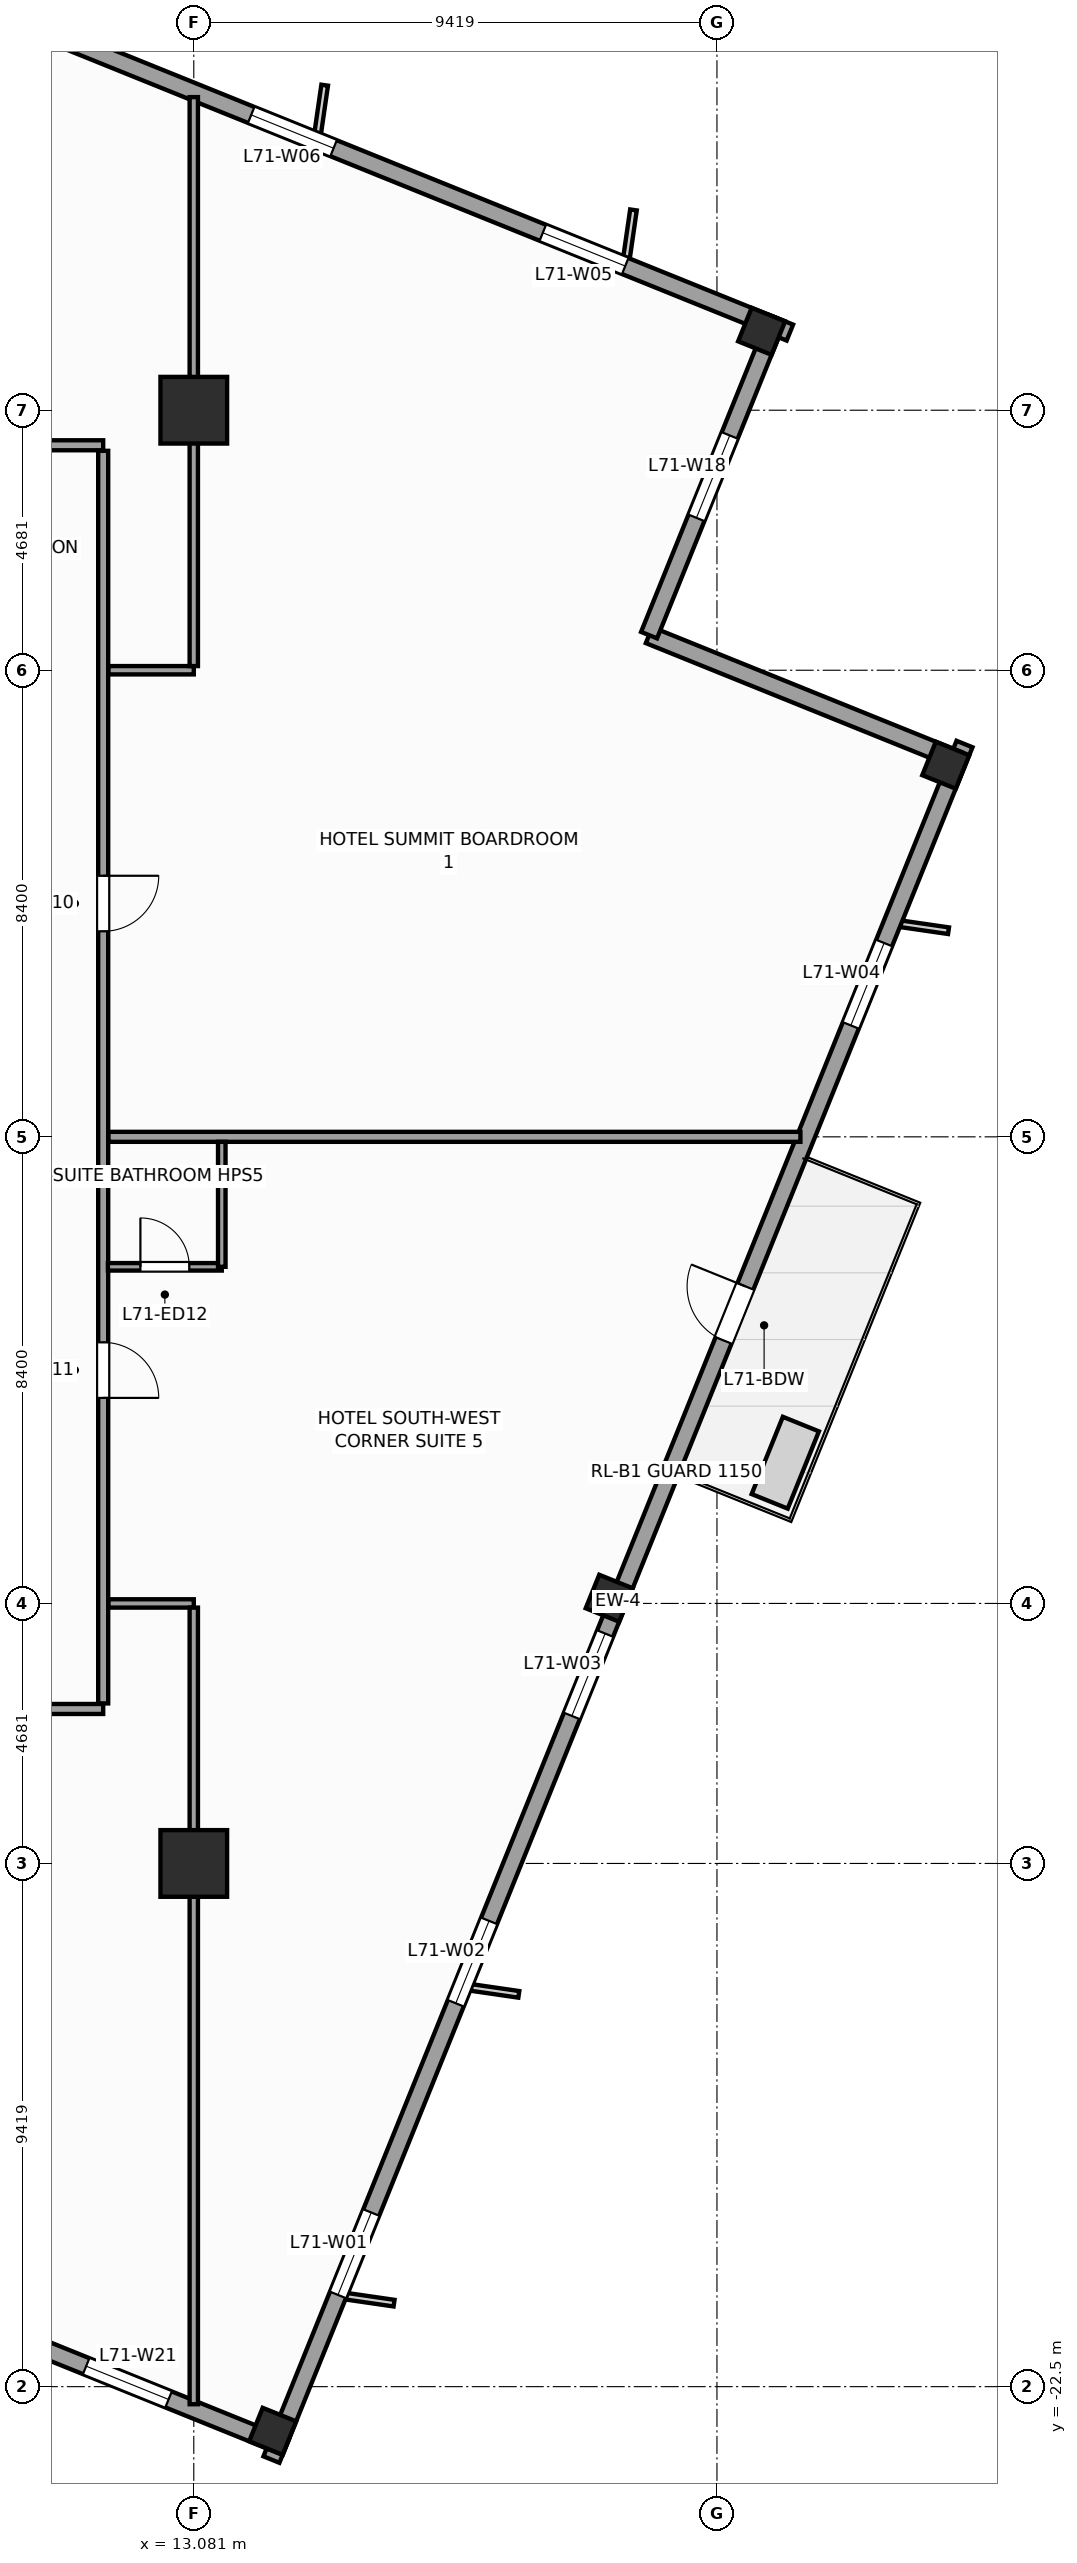
"""IFC4 building model, lengths in metres.
Left out: names, types, materials, properties, quantities, classifications, styles, units other than length and angle.
Written with IfcOpenShell. Run it as: python <this file> out.ifc"""

import sys

from ifc_helpers import new_model, si_unit, direction, frame, frame_2d, origin, origin_2d, place, context, subcontext, project, spatial, rectangle, extrude, source, transform, mapped, element, fill, save


model = new_model("IFC4")
c1 = context("Model", 3, precision=1e-05, world=origin(), true_north=direction((0.0, 1.0)))
c2 = subcontext(c1, "Body", "Model", "MODEL_VIEW")
j1 = project(units=[si_unit("LENGTHUNIT", "METRE"), si_unit("PLANEANGLEUNIT", "RADIAN")], contexts=[c1])
p1 = place(None, origin())
s1 = spatial("IfcSite", under=j1, at=p1, CompositionType="ELEMENT")
p2 = place(p1, origin())
s2 = spatial("IfcBuilding", under=s1, at=p2, CompositionType="ELEMENT")
p3 = place(p2, frame((0.0, 0.0, 290.4)))
s3 = spatial("IfcBuildingStorey", under=s2, at=p3, CompositionType="ELEMENT", Elevation=290.4)
m1 = source(origin(), c2, "Body", "SweptSolid", [
    extrude(rectangle(XDim=1.2, YDim=1.2, at=origin_2d()), origin(), (0.0, 0.0, 1.0), 3.6),
])
for number, where, z_axis, x_axis in (
    (1, (13.081, -13.081, 0.0), (0.0, 0.0, 1.0), (1.0, 0.0, 0.0)),
    (2, (13.081, 13.081, 0.0), (0.0, 0.0, 1.0), (1.0, 0.0, 0.0)),
):
    element("IfcColumn", number, at=place(p3, frame(where, z_axis=z_axis, x_axis=x_axis)), inside=s3, PredefinedType="COLUMN", context=c2, shape_type="MappedRepresentation", body=[
        mapped(m1, transform((0.0, 0.0, 0.0), scale=1.0)),
    ])
m2 = source(origin(), c2, "Body", "SweptSolid", [
    extrude(rectangle(XDim=0.65, YDim=0.65, at=origin_2d()), origin(), (0.0, 0.0, 1.0), 3.6),
])
for number, where, z_axis, x_axis in (
    (3, (14.501, -23.304, 0.0), (0.0, 0.0, 1.0), (0.375, 0.927, 0.0)),
    (4, (20.56, -8.307, 0.0), (0.0, 0.0, 1.0), (0.375, 0.927, 0.0)),
    (5, (26.62, 6.69, 0.0), (0.0, 0.0, 1.0), (0.375, 0.927, 0.0)),
    (6, (23.304, 14.501, 0.0), (0.0, 0.0, 1.0), (0.375, 0.927, 0.0)),
):
    element("IfcColumn", number, at=place(p3, frame(where, z_axis=z_axis, x_axis=x_axis)), inside=s3, PredefinedType="COLUMN", context=c2, shape_type="MappedRepresentation", body=[
        mapped(m2, transform((0.0, 0.0, 0.0), scale=1.0)),
    ])
p4 = place(p3, frame((14.479, -23.813, 0.0), z_axis=(0.0, 0.0, 1.0), x_axis=(0.374609557019, 0.927182657188, 0.0)))
e7 = element("IfcWall", 7, at=p4, inside=s3, PredefinedType="STANDARD", context=c2, shape_type="SweptSolid", body=[
    extrude(rectangle(XDim=33.31, YDim=0.31, at=frame_2d((16.655, 0.0))), origin(), (0.0, 0.0, 1.0), 2.75),
])
p5 = place(p4, frame((21.73, 0.0, 0.0)))
e8 = element("IfcOpeningElement", 8, at=p5, cuts=e7, PredefinedType="OPENING", context=c2, shape_type="SweptSolid", body=[
    extrude(rectangle(XDim=1.05, YDim=2.25, at=frame_2d((0.525, 1.125))), frame((0.0, 0.165, 0.0), z_axis=(0.0, -1.0, 0.0), x_axis=(1.0, 0.0, 0.0)), (0.0, 0.0, 1.0), 0.33),
])
p6 = place(p4, frame((3.197, 0.0, 0.47)))
e9 = element("IfcOpeningElement", 9, at=p6, cuts=e7, PredefinedType="OPENING", context=c2, shape_type="SweptSolid", body=[
    extrude(rectangle(XDim=1.6, YDim=2.1, at=frame_2d((0.8, 1.05))), frame((0.0, 0.165, 0.0), z_axis=(0.0, -1.0, 0.0), x_axis=(1.0, 0.0, 0.0)), (0.0, 0.0, 1.0), 0.33),
])
p7 = place(p4, frame((8.86, 0.0, 0.47)))
e10 = element("IfcOpeningElement", 10, at=p7, cuts=e7, PredefinedType="OPENING", context=c2, shape_type="SweptSolid", body=[
    extrude(rectangle(XDim=1.6, YDim=2.1, at=frame_2d((0.8, 1.05))), frame((0.0, 0.165, 0.0), z_axis=(0.0, -1.0, 0.0), x_axis=(1.0, 0.0, 0.0)), (0.0, 0.0, 1.0), 0.33),
])
p8 = place(p4, frame((14.439, 0.0, 0.47)))
e11 = element("IfcOpeningElement", 11, at=p8, cuts=e7, PredefinedType="OPENING", context=c2, shape_type="SweptSolid", body=[
    extrude(rectangle(XDim=1.6, YDim=2.1, at=frame_2d((0.8, 1.05))), frame((0.0, 0.165, 0.0), z_axis=(0.0, -1.0, 0.0), x_axis=(1.0, 0.0, 0.0)), (0.0, 0.0, 1.0), 0.33),
])
p9 = place(p4, frame((27.847, 0.0, 0.47)))
e12 = element("IfcOpeningElement", 12, at=p9, cuts=e7, PredefinedType="OPENING", context=c2, shape_type="SweptSolid", body=[
    extrude(rectangle(XDim=1.6, YDim=2.1, at=frame_2d((0.8, 1.05))), frame((0.0, 0.165, 0.0), z_axis=(0.0, -1.0, 0.0), x_axis=(1.0, 0.0, 0.0)), (0.0, 0.0, 1.0), 0.33),
])
p10 = place(p3, frame((26.841, 6.784, 0.0), z_axis=(0.0, 0.0, 1.0), x_axis=(-0.927171722085, 0.374636620962, 0.0)))
e13 = element("IfcWall", 13, at=p10, inside=s3, PredefinedType="STANDARD", context=c2, shape_type="SweptSolid", body=[
    extrude(rectangle(XDim=6.0, YDim=0.31, at=frame_2d((3.0, 0.0))), origin(), (0.0, 0.0, 1.0), 2.65),
])
p11 = place(p3, frame((21.278, 9.032, 0.0), z_axis=(0.0, 0.0, 1.0), x_axis=(0.374602739196, 0.927185411764, 0.0)))
e14 = element("IfcWall", 14, at=p11, inside=s3, PredefinedType="STANDARD", context=c2, shape_type="SweptSolid", body=[
    extrude(rectangle(XDim=6.155, YDim=0.31, at=frame_2d((3.078, 0.0))), origin(), (0.0, 0.0, 1.0), 3.35),
])
p12 = place(p11, frame((2.278, 0.0, 0.47)))
e15 = element("IfcOpeningElement", 15, at=p12, cuts=e14, PredefinedType="OPENING", context=c2, shape_type="SweptSolid", body=[
    extrude(rectangle(XDim=1.6, YDim=2.1, at=frame_2d((0.8, 1.05))), frame((0.0, 0.165, 0.0), z_axis=(0.0, -1.0, 0.0), x_axis=(1.0, 0.0, 0.0)), (0.0, 0.0, 1.0), 0.33),
])
p13 = place(p3, frame((23.813, 14.479, 0.0), z_axis=(0.0, 0.0, 1.0), x_axis=(-0.927182657188, 0.374609557019, 0.0)))
e16 = element("IfcWall", 16, at=p13, inside=s3, PredefinedType="STANDARD", context=c2, shape_type="SweptSolid", body=[
    extrude(rectangle(XDim=33.31, YDim=0.31, at=frame_2d((16.655, 0.0))), origin(), (0.0, 0.0, 1.0), 2.75),
])
p14 = place(p13, frame((3.197, 0.0, 0.47)))
e17 = element("IfcOpeningElement", 17, at=p14, cuts=e16, PredefinedType="OPENING", context=c2, shape_type="SweptSolid", body=[
    extrude(rectangle(XDim=1.6, YDim=2.1, at=frame_2d((0.8, 1.05))), frame((0.0, 0.165, 0.0), z_axis=(0.0, -1.0, 0.0), x_axis=(1.0, 0.0, 0.0)), (0.0, 0.0, 1.0), 0.33),
])
p15 = place(p13, frame((8.86, 0.0, 0.47)))
e18 = element("IfcOpeningElement", 18, at=p15, cuts=e16, PredefinedType="OPENING", context=c2, shape_type="SweptSolid", body=[
    extrude(rectangle(XDim=1.6, YDim=2.1, at=frame_2d((0.8, 1.05))), frame((0.0, 0.165, 0.0), z_axis=(0.0, -1.0, 0.0), x_axis=(1.0, 0.0, 0.0)), (0.0, 0.0, 1.0), 0.33),
])
p16 = place(p13, frame((14.439, 0.0, 0.47)))
e19 = element("IfcOpeningElement", 19, at=p16, cuts=e16, PredefinedType="OPENING", context=c2, shape_type="SweptSolid", body=[
    extrude(rectangle(XDim=1.6, YDim=2.1, at=frame_2d((0.8, 1.05))), frame((0.0, 0.165, 0.0), z_axis=(0.0, -1.0, 0.0), x_axis=(1.0, 0.0, 0.0)), (0.0, 0.0, 1.0), 0.33),
])
p17 = place(p13, frame((27.847, 0.0, 0.47)))
e20 = element("IfcOpeningElement", 20, at=p17, cuts=e16, PredefinedType="OPENING", context=c2, shape_type="SweptSolid", body=[
    extrude(rectangle(XDim=1.6, YDim=2.1, at=frame_2d((0.8, 1.05))), frame((0.0, 0.165, 0.0), z_axis=(0.0, -1.0, 0.0), x_axis=(1.0, 0.0, 0.0)), (0.0, 0.0, 1.0), 0.33),
])
p18 = place(p3, frame((9.032, -21.278, 0.0), z_axis=(0.0, 0.0, 1.0), x_axis=(0.927185411764, -0.374602739196, 0.0)))
e21 = element("IfcWall", 21, at=p18, inside=s3, PredefinedType="STANDARD", context=c2, shape_type="SweptSolid", body=[
    extrude(rectangle(XDim=6.155, YDim=0.31, at=frame_2d((3.078, 0.0))), origin(), (0.0, 0.0, 1.0), 3.35),
])
p19 = place(p18, frame((2.278, 0.0, 0.47)))
e22 = element("IfcOpeningElement", 22, at=p19, cuts=e21, PredefinedType="OPENING", context=c2, shape_type="SweptSolid", body=[
    extrude(rectangle(XDim=1.6, YDim=2.1, at=frame_2d((0.8, 1.05))), frame((0.0, 0.165, 0.0), z_axis=(0.0, -1.0, 0.0), x_axis=(1.0, 0.0, 0.0)), (0.0, 0.0, 1.0), 0.33),
])
p20 = place(p3, frame((-11.35, -10.3, 0.0), z_axis=(0.0, 0.0, 1.0), x_axis=(1.0, 0.0, 0.0)))
e23 = element("IfcWall", 23, at=p20, inside=s3, PredefinedType="PARTITIONING", context=c2, shape_type="SweptSolid", body=[
    extrude(rectangle(XDim=22.8, YDim=0.18, at=frame_2d((11.4, 0.0))), origin(), (0.0, 0.0, 1.0), 3.35),
])
p21 = place(p20, frame((12.336, 0.0, 0.0)))
e24 = element("IfcOpeningElement", 24, at=p21, cuts=e23, PredefinedType="OPENING", context=c2, shape_type="SweptSolid", body=[
    extrude(rectangle(XDim=0.95, YDim=2.1, at=frame_2d((0.475, 1.05))), frame((0.0, 0.1, 0.0), z_axis=(0.0, -1.0, 0.0), x_axis=(1.0, 0.0, 0.0)), (0.0, 0.0, 1.0), 0.2),
])
p22 = place(p20, frame((17.71, 0.0, 0.0)))
e25 = element("IfcOpeningElement", 25, at=p22, cuts=e23, PredefinedType="OPENING", context=c2, shape_type="SweptSolid", body=[
    extrude(rectangle(XDim=1.0, YDim=2.15, at=frame_2d((0.5, 1.075))), frame((0.0, 0.1, 0.0), z_axis=(0.0, -1.0, 0.0), x_axis=(1.0, 0.0, 0.0)), (0.0, 0.0, 1.0), 0.2),
])
p23 = place(p20, frame((5.339, 0.0, 0.0)))
e26 = element("IfcOpeningElement", 26, at=p23, cuts=e23, PredefinedType="OPENING", context=c2, shape_type="SweptSolid", body=[
    extrude(rectangle(XDim=1.0, YDim=2.15, at=frame_2d((0.5, 1.075))), frame((0.0, 0.1, 0.0), z_axis=(0.0, -1.0, 0.0), x_axis=(1.0, 0.0, 0.0)), (0.0, 0.0, 1.0), 0.2),
])
p24 = place(p3, frame((-11.35, 12.45, 0.0), z_axis=(0.0, 0.0, 1.0), x_axis=(1.0, 0.0, 0.0)))
e27 = element("IfcWall", 27, at=p24, inside=s3, PredefinedType="PARTITIONING", context=c2, shape_type="SweptSolid", body=[
    extrude(rectangle(XDim=22.8, YDim=0.18, at=frame_2d((11.4, 0.0))), origin(), (0.0, 0.0, 1.0), 3.35),
])
p25 = place(p24, frame((6.089, 0.0, 0.0)))
e28 = element("IfcOpeningElement", 28, at=p25, cuts=e27, PredefinedType="OPENING", context=c2, shape_type="SweptSolid", body=[
    extrude(rectangle(XDim=1.0, YDim=2.15, at=frame_2d((0.5, 1.075))), frame((0.0, 0.1, 0.0), z_axis=(0.0, -1.0, 0.0), x_axis=(1.0, 0.0, 0.0)), (0.0, 0.0, 1.0), 0.2),
])
p26 = place(p24, frame((17.161, 0.0, 0.0)))
e29 = element("IfcOpeningElement", 29, at=p26, cuts=e27, PredefinedType="OPENING", context=c2, shape_type="SweptSolid", body=[
    extrude(rectangle(XDim=1.0, YDim=2.15, at=frame_2d((0.5, 1.075))), frame((0.0, 0.1, 0.0), z_axis=(0.0, -1.0, 0.0), x_axis=(1.0, 0.0, 0.0)), (0.0, 0.0, 1.0), 0.2),
])
p27 = place(p3, frame((11.45, -10.2, 0.0), z_axis=(0.0, 0.0, 1.0), x_axis=(0.0, 1.0, 0.0)))
e30 = element("IfcWall", 30, at=p27, inside=s3, PredefinedType="PARTITIONING", context=c2, shape_type="SweptSolid", body=[
    extrude(rectangle(XDim=22.55, YDim=0.18, at=frame_2d((11.275, 0.0))), origin(), (0.0, 0.0, 1.0), 3.35),
])
p28 = place(p27, frame((13.9, 0.0, 0.0)))
e31 = element("IfcOpeningElement", 31, at=p28, cuts=e30, PredefinedType="OPENING", context=c2, shape_type="SweptSolid", body=[
    extrude(rectangle(XDim=1.0, YDim=2.15, at=frame_2d((0.5, 1.075))), frame((0.0, 0.1, 0.0), z_axis=(0.0, -1.0, 0.0), x_axis=(1.0, 0.0, 0.0)), (0.0, 0.0, 1.0), 0.2),
])
p29 = place(p27, frame((5.5, 0.0, 0.0)))
e32 = element("IfcOpeningElement", 32, at=p29, cuts=e30, PredefinedType="OPENING", context=c2, shape_type="SweptSolid", body=[
    extrude(rectangle(XDim=1.0, YDim=2.15, at=frame_2d((0.5, 1.075))), frame((0.0, 0.1, 0.0), z_axis=(0.0, -1.0, 0.0), x_axis=(1.0, 0.0, 0.0)), (0.0, 0.0, 1.0), 0.2),
])
p30 = place(p3, frame((11.545, 0.0, 0.0), z_axis=(0.0, 0.0, 1.0), x_axis=(1.0, 0.0, 0.0)))
e33 = element("IfcWall", 33, at=p30, inside=s3, PredefinedType="PARTITIONING", context=c2, shape_type="SweptSolid", body=[
    extrude(rectangle(XDim=12.458, YDim=0.18, at=frame_2d((6.229, 0.0))), origin(), (0.0, 0.0, 1.0), 3.35),
])
p31 = place(p3, frame((11.545, 8.4, 0.0), z_axis=(0.0, 0.0, 1.0), x_axis=(1.0, 0.0, 0.0)))
e34 = element("IfcWall", 34, at=p31, inside=s3, PredefinedType="PARTITIONING", context=c2, shape_type="SweptSolid", body=[
    extrude(rectangle(XDim=1.536, YDim=0.15, at=frame_2d((0.768, 0.0))), origin(), (0.0, 0.0, 1.0), 3.35),
])
p32 = place(p3, frame((13.081, 8.475, 0.0), z_axis=(0.0, 0.0, 1.0), x_axis=(0.0, 1.0, 0.0)))
e35 = element("IfcWall", 35, at=p32, inside=s3, PredefinedType="PARTITIONING", context=c2, shape_type="SweptSolid", body=[
    extrude(rectangle(XDim=10.243, YDim=0.15, at=frame_2d((5.121, 0.0))), origin(), (0.0, 0.0, 1.0), 2.45),
])
p33 = place(p3, frame((11.545, -8.4, 0.0), z_axis=(0.0, 0.0, 1.0), x_axis=(1.0, 0.0, 0.0)))
e36 = element("IfcWall", 36, at=p33, inside=s3, PredefinedType="PARTITIONING", context=c2, shape_type="SweptSolid", body=[
    extrude(rectangle(XDim=1.536, YDim=0.15, at=frame_2d((0.768, 0.0))), origin(), (0.0, 0.0, 1.0), 3.35),
])
p34 = place(p3, frame((13.081, -8.475, 0.0), z_axis=(0.0, 0.0, 1.0), x_axis=(0.0, -1.0, 0.0)))
e37 = element("IfcWall", 37, at=p34, inside=s3, PredefinedType="PARTITIONING", context=c2, shape_type="SweptSolid", body=[
    extrude(rectangle(XDim=14.342, YDim=0.15, at=frame_2d((7.171, 0.0))), origin(), (0.0, 0.0, 1.0), 2.45),
])
p35 = place(p3, frame((11.535, -2.34, 0.0), z_axis=(0.0, 0.0, 1.0), x_axis=(1.0, 0.0, 0.0)))
e38 = element("IfcWall", 38, at=p35, inside=s3, PredefinedType="PARTITIONING", context=c2, shape_type="SweptSolid", body=[
    extrude(rectangle(XDim=2.05, YDim=0.135, at=frame_2d((1.025, 0.0))), origin(), (0.0, 0.0, 1.0), 3.35),
])
p36 = place(p35, frame((0.585, 0.0, 0.0)))
e39 = element("IfcOpeningElement", 39, at=p36, cuts=e38, PredefinedType="OPENING", context=c2, shape_type="SweptSolid", body=[
    extrude(rectangle(XDim=0.88, YDim=2.1, at=frame_2d((0.44, 1.05))), frame((0.0, 0.078, 0.0), z_axis=(0.0, -1.0, 0.0), x_axis=(1.0, 0.0, 0.0)), (0.0, 0.0, 1.0), 0.155),
])
p37 = place(p3, frame((13.585, -2.34, 0.0), z_axis=(0.0, 0.0, 1.0), x_axis=(0.0, 1.0, 0.0)))
e40 = element("IfcWall", 40, at=p37, inside=s3, PredefinedType="PARTITIONING", context=c2, shape_type="SweptSolid", body=[
    extrude(rectangle(XDim=2.25, YDim=0.135, at=frame_2d((1.125, 0.0))), origin(), (0.0, 0.0, 1.0), 3.35),
])
m3 = source(origin(), c2, "Body", "SweptSolid", [
    extrude(rectangle(XDim=1.05, YDim=2.25, at=frame_2d((0.525, 1.125))), frame((0.0, 0.025, 0.0), z_axis=(0.0, -1.0, 0.0), x_axis=(1.0, 0.0, 0.0)), (0.0, 0.0, 1.0), 0.05),
])
p38 = place(p5, origin())
e41 = element("IfcDoor", 41, at=p38, inside=s3, OperationType="SINGLE_SWING_RIGHT", PredefinedType="DOOR", context=c2, shape_type="MappedRepresentation", body=[
    mapped(m3, transform((0.0, 0.0, 0.0), scale=1.0)),
])
fill(e8, e41)
m4 = source(origin(), c2, "Body", "SweptSolid", [
    extrude(rectangle(XDim=1.6, YDim=2.1, at=frame_2d((0.8, 1.05))), frame((0.0, 0.03, 0.0), z_axis=(0.0, -1.0, 0.0), x_axis=(1.0, 0.0, 0.0)), (0.0, 0.0, 1.0), 0.06),
])
p39 = place(p6, origin())
e42 = element("IfcWindow", 42, at=p39, inside=s3, PartitioningType="SINGLE_PANEL", PredefinedType="WINDOW", context=c2, shape_type="MappedRepresentation", body=[
    mapped(m4, transform((0.0, 0.0, 0.0), scale=1.0)),
])
fill(e9, e42)
p40 = place(p7, origin())
e43 = element("IfcWindow", 43, at=p40, inside=s3, PartitioningType="SINGLE_PANEL", PredefinedType="WINDOW", context=c2, shape_type="MappedRepresentation", body=[
    mapped(m4, transform((0.0, 0.0, 0.0), scale=1.0)),
])
fill(e10, e43)
p41 = place(p8, origin())
e44 = element("IfcWindow", 44, at=p41, inside=s3, PartitioningType="SINGLE_PANEL", PredefinedType="WINDOW", context=c2, shape_type="MappedRepresentation", body=[
    mapped(m4, transform((0.0, 0.0, 0.0), scale=1.0)),
])
fill(e11, e44)
p42 = place(p9, origin())
e45 = element("IfcWindow", 45, at=p42, inside=s3, PartitioningType="SINGLE_PANEL", PredefinedType="WINDOW", context=c2, shape_type="MappedRepresentation", body=[
    mapped(m4, transform((0.0, 0.0, 0.0), scale=1.0)),
])
fill(e12, e45)
p43 = place(p14, origin())
e46 = element("IfcWindow", 46, at=p43, inside=s3, PartitioningType="SINGLE_PANEL", PredefinedType="WINDOW", context=c2, shape_type="MappedRepresentation", body=[
    mapped(m4, transform((0.0, 0.0, 0.0), scale=1.0)),
])
fill(e17, e46)
p44 = place(p15, origin())
e47 = element("IfcWindow", 47, at=p44, inside=s3, PartitioningType="SINGLE_PANEL", PredefinedType="WINDOW", context=c2, shape_type="MappedRepresentation", body=[
    mapped(m4, transform((0.0, 0.0, 0.0), scale=1.0)),
])
fill(e18, e47)
p45 = place(p12, origin())
e48 = element("IfcWindow", 48, at=p45, inside=s3, PartitioningType="SINGLE_PANEL", PredefinedType="WINDOW", context=c2, shape_type="MappedRepresentation", body=[
    mapped(m4, transform((0.0, 0.0, 0.0), scale=1.0)),
])
fill(e15, e48)
p46 = place(p19, origin())
e49 = element("IfcWindow", 49, at=p46, inside=s3, PartitioningType="SINGLE_PANEL", PredefinedType="WINDOW", context=c2, shape_type="MappedRepresentation", body=[
    mapped(m4, transform((0.0, 0.0, 0.0), scale=1.0)),
])
fill(e22, e49)
m5 = source(origin(), c2, "Body", "SweptSolid", [
    extrude(rectangle(XDim=1.0, YDim=2.15, at=frame_2d((0.5, 1.075))), frame((0.0, 0.025, 0.0), z_axis=(0.0, -1.0, 0.0), x_axis=(1.0, 0.0, 0.0)), (0.0, 0.0, 1.0), 0.05),
])
p47 = place(p28, frame((1.0, 0.0, 0.0), z_axis=(0.0, 0.0, 1.0), x_axis=(-1.0, 0.0, 0.0)))
e50 = element("IfcDoor", 50, at=p47, inside=s3, OperationType="SINGLE_SWING_RIGHT", PredefinedType="DOOR", context=c2, shape_type="MappedRepresentation", body=[
    mapped(m5, transform((0.0, 0.0, 0.0), scale=1.0)),
])
fill(e31, e50)
p48 = place(p29, frame((1.0, 0.0, 0.0), z_axis=(0.0, 0.0, 1.0), x_axis=(-1.0, 0.0, 0.0)))
e51 = element("IfcDoor", 51, at=p48, inside=s3, OperationType="SINGLE_SWING_LEFT", PredefinedType="DOOR", context=c2, shape_type="MappedRepresentation", body=[
    mapped(m5, transform((0.0, 0.0, 0.0), scale=1.0)),
])
fill(e32, e51)
m6 = source(origin(), c2, "Body", "SweptSolid", [
    extrude(rectangle(XDim=0.88, YDim=2.1, at=frame_2d((0.44, 1.05))), frame((0.0, 0.025, 0.0), z_axis=(0.0, -1.0, 0.0), x_axis=(1.0, 0.0, 0.0)), (0.0, 0.0, 1.0), 0.05),
])
p49 = place(p36, origin())
e52 = element("IfcDoor", 52, at=p49, inside=s3, OperationType="SINGLE_SWING_LEFT", PredefinedType="DOOR", context=c2, shape_type="MappedRepresentation", body=[
    mapped(m6, transform((0.0, 0.0, 0.0), scale=1.0)),
])
fill(e39, e52)
save(model, sys.argv[1])
